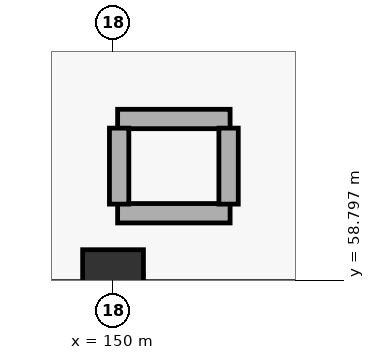
"""IFC4 building model, lengths in metres.
Left out: names, types, materials, properties, quantities, classifications, styles, units other than length and angle.
Written with IfcOpenShell. Run it as: python <this file> out.ifc"""

import sys

from ifc_helpers import new_model, si_unit, direction, frame, frame_2d, origin, origin_2d, place, context, subcontext, project, spatial, rectangle, extrude, element, save


model = new_model("IFC4")
c1 = context("Model", 3, precision=1e-05, world=origin(), true_north=direction((0.0, 1.0)))
c2 = subcontext(c1, "Body", "Model", "MODEL_VIEW")
j1 = project(units=[si_unit("LENGTHUNIT", "METRE"), si_unit("PLANEANGLEUNIT", "RADIAN")], contexts=[c1])
p1 = place(None, origin())
s1 = spatial("IfcSite", under=j1, at=p1, CompositionType="ELEMENT")
p2 = place(p1, origin())
s2 = spatial("IfcBuilding", under=s1, at=p2, CompositionType="ELEMENT")
p3 = place(p2, frame((0.0, 0.0, 10.5)))
s3 = spatial("IfcBuildingStorey", under=s2, at=p3, CompositionType="ELEMENT", Elevation=10.5)
p4 = place(p3, frame((150.0, 58.8, 0.0), z_axis=(0.0, 0.0, 1.0), x_axis=(1.0, 0.0, 0.0)))
e1 = element("IfcColumn", 1, at=p4, inside=s3, PredefinedType="COLUMN", context=c2, shape_type="SweptSolid", body=[
    extrude(rectangle(XDim=0.8, YDim=0.8, at=origin_2d()), origin(), (0.0, 0.0, 1.0), 5.1),
])
for number, where, z_axis, x_axis in (
    (2, (150.06, 60.92, 0.0), (0.0, 0.0, 1.0), (1.0, 0.0, 0.0)),
    (3, (150.06, 59.68, 0.0), (0.0, 0.0, 1.0), (1.0, 0.0, 0.0)),
):
    element("IfcWall", number, at=place(p3, frame(where, z_axis=z_axis, x_axis=x_axis)), inside=s3, PredefinedType="PARTITIONING", context=c2, shape_type="SweptSolid", body=[
        extrude(rectangle(XDim=1.48, YDim=0.255, at=frame_2d((0.74, 0.0))), origin(), (0.0, 0.0, 1.0), 3.9),
    ])
p5 = place(p3, frame((150.08, 59.8, 0.0), z_axis=(0.0, 0.0, 1.0), x_axis=(0.0, 1.0, 0.0)))
e4 = element("IfcWall", 4, at=p5, inside=s3, PredefinedType="PARTITIONING", context=c2, shape_type="SweptSolid", body=[
    extrude(rectangle(XDim=1.0, YDim=0.255, at=frame_2d((0.5, 0.0))), origin(), (0.0, 0.0, 1.0), 3.9),
])
p6 = place(p3, frame((151.52, 59.8, 0.0), z_axis=(0.0, 0.0, 1.0), x_axis=(0.0, 1.0, 0.0)))
e5 = element("IfcWall", 5, at=p6, inside=s3, PredefinedType="PARTITIONING", context=c2, shape_type="SweptSolid", body=[
    extrude(rectangle(XDim=1.0, YDim=0.255, at=frame_2d((0.5, 0.0))), origin(), (0.0, 0.0, 1.0), 4.72),
])
save(model, sys.argv[1])
